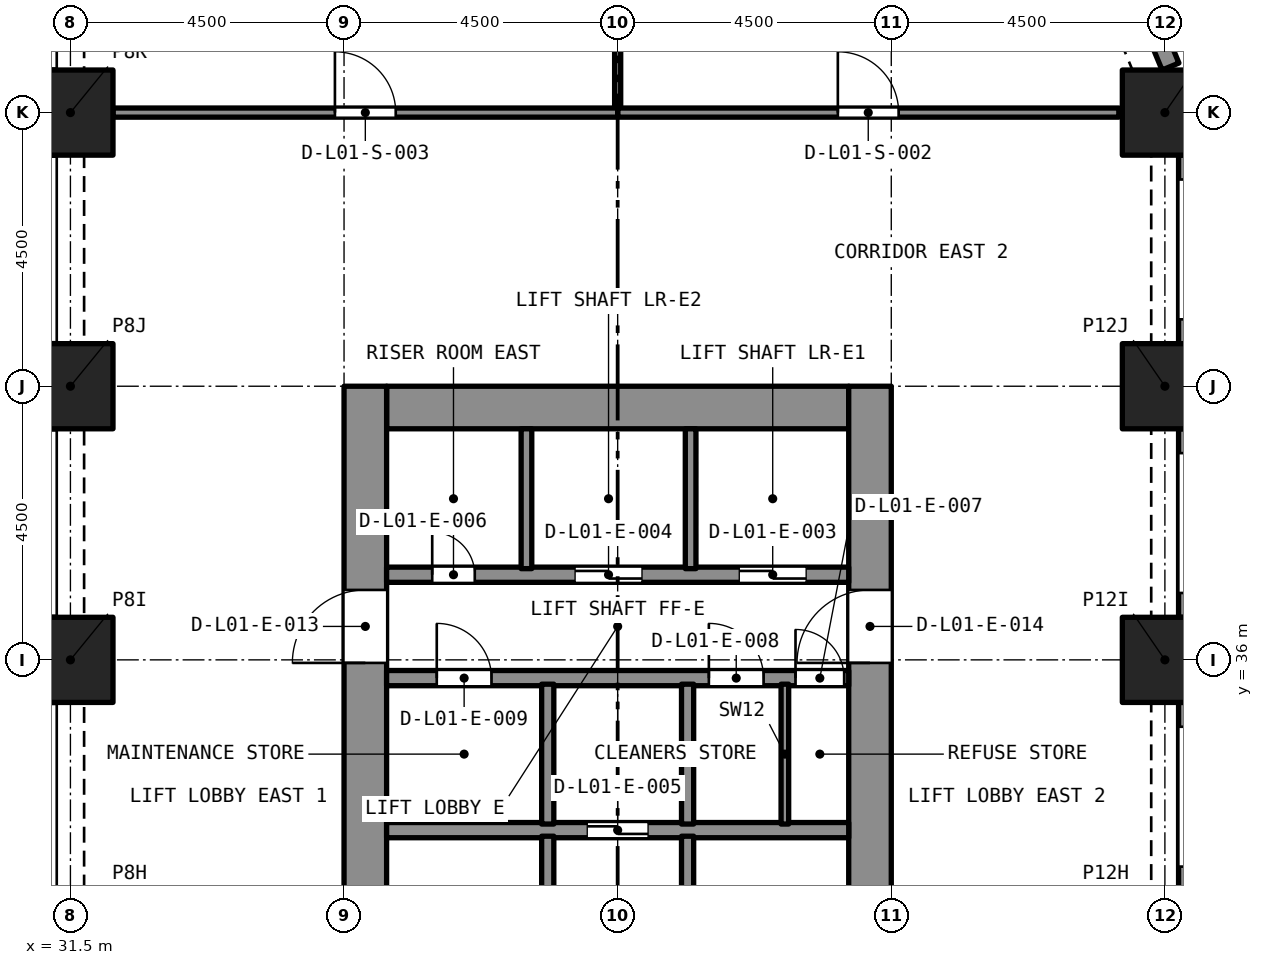
"""IFC4 building model, lengths in metres.
Left out: names, types, materials, properties, quantities, classifications, styles, units other than length and angle.
Written with IfcOpenShell. Run it as: python <this file> out.ifc"""

import sys

from ifc_helpers import new_model, si_unit, direction, frame, frame_2d, origin, origin_2d, place, context, subcontext, project, spatial, rectangle, extrude, element, fill, save


model = new_model("IFC4")
c1 = context("Model", 3, precision=1e-05, world=origin(), true_north=direction((0.0, 1.0)))
c2 = subcontext(c1, "Body", "Model", "MODEL_VIEW")
j1 = project(units=[si_unit("LENGTHUNIT", "METRE"), si_unit("PLANEANGLEUNIT", "RADIAN")], contexts=[c1])
p1 = place(None, origin())
s1 = spatial("IfcSite", under=j1, at=p1, CompositionType="ELEMENT")
p2 = place(p1, origin())
s2 = spatial("IfcBuilding", under=s1, at=p2, CompositionType="ELEMENT")
p3 = place(p2, frame((0.0, 0.0, 6.0)))
s3 = spatial("IfcBuildingStorey", under=s2, at=p3, CompositionType="ELEMENT", Elevation=6.0)
for number, where, z_axis, x_axis in (
    (1, (31.5, 36.0, 0.0), (0.0, 0.0, 1.0), (1.0, 0.0, 0.0)),
    (2, (49.5, 36.0, 0.0), (0.0, 0.0, 1.0), (1.0, 0.0, 0.0)),
    (3, (31.5, 40.5, 0.0), (0.0, 0.0, 1.0), (1.0, 0.0, 0.0)),
    (4, (49.5, 40.5, 0.0), (0.0, 0.0, 1.0), (1.0, 0.0, 0.0)),
    (5, (31.5, 45.0, 0.0), (0.0, 0.0, 1.0), (1.0, 0.0, 0.0)),
    (6, (49.5, 45.0, 0.0), (0.0, 0.0, 1.0), (1.0, 0.0, 0.0)),
):
    element("IfcColumn", number, at=place(p3, frame(where, z_axis=z_axis, x_axis=x_axis)), inside=s3, PredefinedType="COLUMN", context=c2, shape_type="SweptSolid", body=[
        extrude(rectangle(XDim=1.4, YDim=1.4, at=origin_2d()), origin(), (0.0, 0.0, 1.0), 5.0),
    ])
p4 = place(p3, frame((36.7, 40.15, 0.0), z_axis=(0.0, 0.0, 1.0), x_axis=(1.0, 0.0, 0.0)))
e7 = element("IfcWall", 7, at=p4, inside=s3, PredefinedType="SOLIDWALL", context=c2, shape_type="SweptSolid", body=[
    extrude(rectangle(XDim=7.6, YDim=0.7, at=frame_2d((3.8, 0.0))), origin(), (0.0, 0.0, 1.0), 5.0),
])
p5 = place(p3, frame((36.35, 27.0, 0.0), z_axis=(0.0, 0.0, 1.0), x_axis=(0.0, 1.0, 0.0)))
e8 = element("IfcWall", 8, at=p5, inside=s3, PredefinedType="SOLIDWALL", context=c2, shape_type="SweptSolid", body=[
    extrude(rectangle(XDim=13.5, YDim=0.7, at=frame_2d((6.75, 0.0))), origin(), (0.0, 0.0, 1.0), 5.0),
])
p6 = place(p5, frame((8.95, 0.0, 0.0)))
e9 = element("IfcOpeningElement", 9, at=p6, cuts=e8, PredefinedType="OPENING", context=c2, shape_type="SweptSolid", body=[
    extrude(rectangle(XDim=1.2, YDim=2.1, at=frame_2d((0.6, 1.05))), frame((0.0, 0.36, 0.0), z_axis=(0.0, -1.0, 0.0), x_axis=(1.0, 0.0, 0.0)), (0.0, 0.0, 1.0), 0.72),
])
p7 = place(p3, frame((44.65, 27.0, 0.0), z_axis=(0.0, 0.0, 1.0), x_axis=(0.0, 1.0, 0.0)))
e10 = element("IfcWall", 10, at=p7, inside=s3, PredefinedType="SOLIDWALL", context=c2, shape_type="SweptSolid", body=[
    extrude(rectangle(XDim=13.5, YDim=0.7, at=frame_2d((6.75, 0.0))), origin(), (0.0, 0.0, 1.0), 5.0),
])
p8 = place(p7, frame((8.95, 0.0, 0.0)))
e11 = element("IfcOpeningElement", 11, at=p8, cuts=e10, PredefinedType="OPENING", context=c2, shape_type="SweptSolid", body=[
    extrude(rectangle(XDim=1.2, YDim=2.1, at=frame_2d((0.6, 1.05))), frame((0.0, 0.36, 0.0), z_axis=(0.0, -1.0, 0.0), x_axis=(1.0, 0.0, 0.0)), (0.0, 0.0, 1.0), 0.72),
])
p9 = place(p3, frame((49.875, 35.3, 0.0), z_axis=(0.0, 0.0, 1.0), x_axis=(0.0, -1.0, 0.0)))
e12 = element("IfcWall", 12, at=p9, inside=s3, PredefinedType="SOLIDWALL", context=c2, shape_type="SweptSolid", body=[
    extrude(rectangle(XDim=3.1, YDim=0.3, at=frame_2d((1.55, 0.0))), origin(), (0.0, 0.0, 1.0), 5.0),
])
p10 = place(p9, frame((0.4, 0.0, 0.45)))
e13 = element("IfcOpeningElement", 13, at=p10, cuts=e12, PredefinedType="OPENING", context=c2, shape_type="SweptSolid", body=[
    extrude(rectangle(XDim=2.3, YDim=3.3, at=frame_2d((1.15, 1.65))), frame((0.0, 0.16, 0.0), z_axis=(0.0, -1.0, 0.0), x_axis=(1.0, 0.0, 0.0)), (0.0, 0.0, 1.0), 0.32),
])
p11 = place(p3, frame((49.875, 39.8, 0.0), z_axis=(0.0, 0.0, 1.0), x_axis=(0.0, -1.0, 0.0)))
e14 = element("IfcWall", 14, at=p11, inside=s3, PredefinedType="SOLIDWALL", context=c2, shape_type="SweptSolid", body=[
    extrude(rectangle(XDim=3.1, YDim=0.3, at=frame_2d((1.55, 0.0))), origin(), (0.0, 0.0, 1.0), 5.0),
])
p12 = place(p11, frame((0.4, 0.0, 0.45)))
e15 = element("IfcOpeningElement", 15, at=p12, cuts=e14, PredefinedType="OPENING", context=c2, shape_type="SweptSolid", body=[
    extrude(rectangle(XDim=2.3, YDim=3.3, at=frame_2d((1.15, 1.65))), frame((0.0, 0.16, 0.0), z_axis=(0.0, -1.0, 0.0), x_axis=(1.0, 0.0, 0.0)), (0.0, 0.0, 1.0), 0.32),
])
p13 = place(p3, frame((49.875, 44.3, 0.0), z_axis=(0.0, 0.0, 1.0), x_axis=(0.0, -1.0, 0.0)))
e16 = element("IfcWall", 16, at=p13, inside=s3, PredefinedType="SOLIDWALL", context=c2, shape_type="SweptSolid", body=[
    extrude(rectangle(XDim=3.1, YDim=0.3, at=frame_2d((1.55, 0.0))), origin(), (0.0, 0.0, 1.0), 5.0),
])
p14 = place(p13, frame((0.4, 0.0, 0.45)))
e17 = element("IfcOpeningElement", 17, at=p14, cuts=e16, PredefinedType="OPENING", context=c2, shape_type="SweptSolid", body=[
    extrude(rectangle(XDim=2.3, YDim=3.3, at=frame_2d((1.15, 1.65))), frame((0.0, 0.16, 0.0), z_axis=(0.0, -1.0, 0.0), x_axis=(1.0, 0.0, 0.0)), (0.0, 0.0, 1.0), 0.32),
])
p15 = place(p3, frame((48.878, 47.48, 0.0), z_axis=(0.0, 0.0, 1.0), x_axis=(0.38262540684, -0.923903565336, 0.0)))
e18 = element("IfcWall", 18, at=p15, inside=s3, PredefinedType="SOLIDWALL", context=c2, shape_type="SweptSolid", body=[
    extrude(rectangle(XDim=1.865, YDim=0.3, at=frame_2d((0.933, 0.0))), origin(), (0.0, 0.0, 1.0), 5.0),
])
p16 = place(p15, frame((0.258, 0.0, 0.45)))
e19 = element("IfcOpeningElement", 19, at=p16, cuts=e18, PredefinedType="OPENING", context=c2, shape_type="SweptSolid", body=[
    extrude(rectangle(XDim=1.1, YDim=3.3, at=frame_2d((0.55, 1.65))), frame((0.0, 0.16, 0.0), z_axis=(0.0, -1.0, 0.0), x_axis=(1.0, 0.0, 0.0)), (0.0, 0.0, 1.0), 0.32),
])
p17 = place(p3, frame((36.7, 33.2, 0.0), z_axis=(0.0, 0.0, 1.0), x_axis=(1.0, 0.0, 0.0)))
e20 = element("IfcWall", 20, at=p17, inside=s3, PredefinedType="SOLIDWALL", context=c2, shape_type="SweptSolid", body=[
    extrude(rectangle(XDim=7.6, YDim=0.25, at=frame_2d((3.8, 0.0))), origin(), (0.0, 0.0, 1.0), 4.65),
])
p18 = place(p17, frame((3.3, 0.0, 0.0)))
e21 = element("IfcOpeningElement", 21, at=p18, cuts=e20, PredefinedType="OPENING", context=c2, shape_type="SweptSolid", body=[
    extrude(rectangle(XDim=1.0, YDim=2.1, at=frame_2d((0.5, 1.05))), frame((0.0, 0.135, 0.0), z_axis=(0.0, -1.0, 0.0), x_axis=(1.0, 0.0, 0.0)), (0.0, 0.0, 1.0), 0.27),
])
p19 = place(p3, frame((36.7, 35.7, 0.0), z_axis=(0.0, 0.0, 1.0), x_axis=(1.0, 0.0, 0.0)))
e22 = element("IfcWall", 22, at=p19, inside=s3, PredefinedType="SOLIDWALL", context=c2, shape_type="SweptSolid", body=[
    extrude(rectangle(XDim=7.6, YDim=0.25, at=frame_2d((3.8, 0.0))), origin(), (0.0, 0.0, 1.0), 4.65),
])
p20 = place(p19, frame((6.725, 0.0, 0.0)))
e23 = element("IfcOpeningElement", 23, at=p20, cuts=e22, PredefinedType="OPENING", context=c2, shape_type="SweptSolid", body=[
    extrude(rectangle(XDim=0.8, YDim=2.1, at=frame_2d((0.4, 1.05))), frame((0.0, 0.135, 0.0), z_axis=(0.0, -1.0, 0.0), x_axis=(1.0, 0.0, 0.0)), (0.0, 0.0, 1.0), 0.27),
])
p21 = place(p19, frame((5.3, 0.0, 0.0)))
e24 = element("IfcOpeningElement", 24, at=p21, cuts=e22, PredefinedType="OPENING", context=c2, shape_type="SweptSolid", body=[
    extrude(rectangle(XDim=0.9, YDim=2.1, at=frame_2d((0.45, 1.05))), frame((0.0, 0.135, 0.0), z_axis=(0.0, -1.0, 0.0), x_axis=(1.0, 0.0, 0.0)), (0.0, 0.0, 1.0), 0.27),
])
p22 = place(p19, frame((0.825, 0.0, 0.0)))
e25 = element("IfcOpeningElement", 25, at=p22, cuts=e22, PredefinedType="OPENING", context=c2, shape_type="SweptSolid", body=[
    extrude(rectangle(XDim=0.9, YDim=2.1, at=frame_2d((0.45, 1.05))), frame((0.0, 0.135, 0.0), z_axis=(0.0, -1.0, 0.0), x_axis=(1.0, 0.0, 0.0)), (0.0, 0.0, 1.0), 0.27),
])
p23 = place(p3, frame((36.7, 37.4, 0.0), z_axis=(0.0, 0.0, 1.0), x_axis=(1.0, 0.0, 0.0)))
e26 = element("IfcWall", 26, at=p23, inside=s3, PredefinedType="SOLIDWALL", context=c2, shape_type="SweptSolid", body=[
    extrude(rectangle(XDim=7.6, YDim=0.25, at=frame_2d((3.8, 0.0))), origin(), (0.0, 0.0, 1.0), 4.65),
])
p24 = place(p23, frame((5.8, 0.0, 0.0)))
e27 = element("IfcOpeningElement", 27, at=p24, cuts=e26, PredefinedType="OPENING", context=c2, shape_type="SweptSolid", body=[
    extrude(rectangle(XDim=1.1, YDim=2.4, at=frame_2d((0.55, 1.2))), frame((0.0, 0.135, 0.0), z_axis=(0.0, -1.0, 0.0), x_axis=(1.0, 0.0, 0.0)), (0.0, 0.0, 1.0), 0.27),
])
p25 = place(p23, frame((3.1, 0.0, 0.0)))
e28 = element("IfcOpeningElement", 28, at=p25, cuts=e26, PredefinedType="OPENING", context=c2, shape_type="SweptSolid", body=[
    extrude(rectangle(XDim=1.1, YDim=2.4, at=frame_2d((0.55, 1.2))), frame((0.0, 0.135, 0.0), z_axis=(0.0, -1.0, 0.0), x_axis=(1.0, 0.0, 0.0)), (0.0, 0.0, 1.0), 0.27),
])
p26 = place(p23, frame((0.75, 0.0, 0.0)))
e29 = element("IfcOpeningElement", 29, at=p26, cuts=e26, PredefinedType="OPENING", context=c2, shape_type="SweptSolid", body=[
    extrude(rectangle(XDim=0.7, YDim=2.1, at=frame_2d((0.35, 1.05))), frame((0.0, 0.135, 0.0), z_axis=(0.0, -1.0, 0.0), x_axis=(1.0, 0.0, 0.0)), (0.0, 0.0, 1.0), 0.27),
])
p27 = place(p3, frame((41.65, 27.7, 0.0), z_axis=(0.0, 0.0, 1.0), x_axis=(0.0, 1.0, 0.0)))
e30 = element("IfcWall", 30, at=p27, inside=s3, PredefinedType="SOLIDWALL", context=c2, shape_type="SweptSolid", body=[
    extrude(rectangle(XDim=5.4, YDim=0.2, at=frame_2d((2.7, 0.0))), origin(), (0.0, 0.0, 1.0), 4.65),
])
p28 = place(p27, frame((0.2, 0.0, 0.0)))
e31 = element("IfcOpeningElement", 31, at=p28, cuts=e30, PredefinedType="OPENING", context=c2, shape_type="SweptSolid", body=[
    extrude(rectangle(XDim=0.9, YDim=2.1, at=frame_2d((0.45, 1.05))), frame((0.0, 0.11, 0.0), z_axis=(0.0, -1.0, 0.0), x_axis=(1.0, 0.0, 0.0)), (0.0, 0.0, 1.0), 0.22),
])
p29 = place(p3, frame((39.35, 27.7, 0.0), z_axis=(0.0, 0.0, 1.0), x_axis=(0.0, 1.0, 0.0)))
e32 = element("IfcWall", 32, at=p29, inside=s3, PredefinedType="SOLIDWALL", context=c2, shape_type="SweptSolid", body=[
    extrude(rectangle(XDim=5.4, YDim=0.2, at=frame_2d((2.7, 0.0))), origin(), (0.0, 0.0, 1.0), 4.65),
])
p30 = place(p29, frame((0.2, 0.0, 0.0)))
e33 = element("IfcOpeningElement", 33, at=p30, cuts=e32, PredefinedType="OPENING", context=c2, shape_type="SweptSolid", body=[
    extrude(rectangle(XDim=0.9, YDim=2.1, at=frame_2d((0.45, 1.05))), frame((0.0, 0.11, 0.0), z_axis=(0.0, -1.0, 0.0), x_axis=(1.0, 0.0, 0.0)), (0.0, 0.0, 1.0), 0.22),
])
for number, where, z_axis, x_axis in (
    (34, (41.65, 33.3, 0.0), (0.0, 0.0, 1.0), (0.0, 1.0, 0.0)),
    (35, (39.35, 33.3, 0.0), (0.0, 0.0, 1.0), (0.0, 1.0, 0.0)),
):
    element("IfcWall", number, at=place(p3, frame(where, z_axis=z_axis, x_axis=x_axis)), inside=s3, PredefinedType="SOLIDWALL", context=c2, shape_type="SweptSolid", body=[
        extrude(rectangle(XDim=2.3, YDim=0.2, at=frame_2d((1.15, 0.0))), origin(), (0.0, 0.0, 1.0), 4.65),
    ])
for number, where, z_axis, x_axis in (
    (36, (41.7, 37.5, 0.0), (0.0, 0.0, 1.0), (0.0, 1.0, 0.0)),
    (37, (39.0, 37.5, 0.0), (0.0, 0.0, 1.0), (0.0, 1.0, 0.0)),
):
    element("IfcWall", number, at=place(p3, frame(where, z_axis=z_axis, x_axis=x_axis)), inside=s3, PredefinedType="SOLIDWALL", context=c2, shape_type="SweptSolid", body=[
        extrude(rectangle(XDim=2.3, YDim=0.175, at=frame_2d((1.15, 0.0))), origin(), (0.0, 0.0, 1.0), 4.65),
    ])
p31 = place(p3, frame((43.25, 33.3, 0.0), z_axis=(0.0, 0.0, 1.0), x_axis=(0.0, 1.0, 0.0)))
e38 = element("IfcWall", 38, at=p31, inside=s3, PredefinedType="PARTITIONING", context=c2, shape_type="SweptSolid", body=[
    extrude(rectangle(XDim=2.3, YDim=0.125, at=frame_2d((1.15, 0.0))), origin(), (0.0, 0.0, 1.0), 4.65),
])
p32 = place(p3, frame((40.5, 45.075, 0.0), z_axis=(0.0, 0.0, 1.0), x_axis=(0.0, 1.0, 0.0)))
e39 = element("IfcWall", 39, at=p32, inside=s3, PredefinedType="PARTITIONING", context=c2, shape_type="SweptSolid", body=[
    extrude(rectangle(XDim=3.725, YDim=0.1, at=frame_2d((1.863, 0.0))), origin(), (0.0, 0.0, 1.0), 4.65),
])
p33 = place(p3, frame((40.5, 45.0, 0.0), z_axis=(0.0, 0.0, 1.0), x_axis=(1.0, 0.0, 0.0)))
e40 = element("IfcWall", 40, at=p33, inside=s3, PredefinedType="PARTITIONING", context=c2, shape_type="SweptSolid", body=[
    extrude(rectangle(XDim=8.242, YDim=0.15, at=frame_2d((4.121, 0.0))), origin(), (0.0, 0.0, 1.0), 4.65),
])
p34 = place(p33, frame((3.621, 0.0, 0.0)))
e41 = element("IfcOpeningElement", 41, at=p34, cuts=e40, PredefinedType="OPENING", context=c2, shape_type="SweptSolid", body=[
    extrude(rectangle(XDim=1.0, YDim=2.1, at=frame_2d((0.5, 1.05))), frame((0.0, 0.085, 0.0), z_axis=(0.0, -1.0, 0.0), x_axis=(1.0, 0.0, 0.0)), (0.0, 0.0, 1.0), 0.17),
])
p35 = place(p3, frame((32.2, 45.0, 0.0), z_axis=(0.0, 0.0, 1.0), x_axis=(1.0, 0.0, 0.0)))
e42 = element("IfcWall", 42, at=p35, inside=s3, PredefinedType="PARTITIONING", context=c2, shape_type="SweptSolid", body=[
    extrude(rectangle(XDim=8.3, YDim=0.15, at=frame_2d((4.15, 0.0))), origin(), (0.0, 0.0, 1.0), 4.65),
])
p36 = place(p35, frame((3.65, 0.0, 0.0)))
e43 = element("IfcOpeningElement", 43, at=p36, cuts=e42, PredefinedType="OPENING", context=c2, shape_type="SweptSolid", body=[
    extrude(rectangle(XDim=1.0, YDim=2.1, at=frame_2d((0.5, 1.05))), frame((0.0, 0.085, 0.0), z_axis=(0.0, -1.0, 0.0), x_axis=(1.0, 0.0, 0.0)), (0.0, 0.0, 1.0), 0.17),
])
p37 = place(p24, origin())
e44 = element("IfcDoor", 44, at=p37, inside=s3, OperationType="SLIDING_TO_LEFT", PredefinedType="DOOR", context=c2, shape_type="SweptSolid", body=[
    extrude(rectangle(XDim=1.1, YDim=2.4, at=frame_2d((0.55, 1.2))), frame((0.0, 0.025, 0.0), z_axis=(0.0, -1.0, 0.0), x_axis=(1.0, 0.0, 0.0)), (0.0, 0.0, 1.0), 0.05),
])
fill(e27, e44)
p38 = place(p25, origin())
e45 = element("IfcDoor", 45, at=p38, inside=s3, OperationType="SLIDING_TO_LEFT", PredefinedType="DOOR", context=c2, shape_type="SweptSolid", body=[
    extrude(rectangle(XDim=1.1, YDim=2.4, at=frame_2d((0.55, 1.2))), frame((0.0, 0.025, 0.0), z_axis=(0.0, -1.0, 0.0), x_axis=(1.0, 0.0, 0.0)), (0.0, 0.0, 1.0), 0.05),
])
fill(e28, e45)
p39 = place(p18, origin())
e46 = element("IfcDoor", 46, at=p39, inside=s3, OperationType="SLIDING_TO_LEFT", PredefinedType="DOOR", context=c2, shape_type="SweptSolid", body=[
    extrude(rectangle(XDim=1.0, YDim=2.1, at=frame_2d((0.5, 1.05))), frame((0.0, 0.025, 0.0), z_axis=(0.0, -1.0, 0.0), x_axis=(1.0, 0.0, 0.0)), (0.0, 0.0, 1.0), 0.05),
])
fill(e21, e46)
p40 = place(p26, origin())
e47 = element("IfcDoor", 47, at=p40, inside=s3, OperationType="SINGLE_SWING_LEFT", PredefinedType="DOOR", context=c2, shape_type="SweptSolid", body=[
    extrude(rectangle(XDim=0.7, YDim=2.1, at=frame_2d((0.35, 1.05))), frame((0.0, 0.025, 0.0), z_axis=(0.0, -1.0, 0.0), x_axis=(1.0, 0.0, 0.0)), (0.0, 0.0, 1.0), 0.05),
])
fill(e29, e47)
p41 = place(p20, origin())
e48 = element("IfcDoor", 48, at=p41, inside=s3, OperationType="SINGLE_SWING_LEFT", PredefinedType="DOOR", context=c2, shape_type="SweptSolid", body=[
    extrude(rectangle(XDim=0.8, YDim=2.1, at=frame_2d((0.4, 1.05))), frame((0.0, 0.025, 0.0), z_axis=(0.0, -1.0, 0.0), x_axis=(1.0, 0.0, 0.0)), (0.0, 0.0, 1.0), 0.05),
])
fill(e23, e48)
p42 = place(p21, origin())
e49 = element("IfcDoor", 49, at=p42, inside=s3, OperationType="SINGLE_SWING_LEFT", PredefinedType="DOOR", context=c2, shape_type="SweptSolid", body=[
    extrude(rectangle(XDim=0.9, YDim=2.1, at=frame_2d((0.45, 1.05))), frame((0.0, 0.025, 0.0), z_axis=(0.0, -1.0, 0.0), x_axis=(1.0, 0.0, 0.0)), (0.0, 0.0, 1.0), 0.05),
])
fill(e24, e49)
p43 = place(p22, origin())
e50 = element("IfcDoor", 50, at=p43, inside=s3, OperationType="SINGLE_SWING_LEFT", PredefinedType="DOOR", context=c2, shape_type="SweptSolid", body=[
    extrude(rectangle(XDim=0.9, YDim=2.1, at=frame_2d((0.45, 1.05))), frame((0.0, 0.025, 0.0), z_axis=(0.0, -1.0, 0.0), x_axis=(1.0, 0.0, 0.0)), (0.0, 0.0, 1.0), 0.05),
])
fill(e25, e50)
p44 = place(p6, origin())
e51 = element("IfcDoor", 51, at=p44, inside=s3, OperationType="SINGLE_SWING_LEFT", PredefinedType="DOOR", context=c2, shape_type="SweptSolid", body=[
    extrude(rectangle(XDim=1.2, YDim=2.1, at=frame_2d((0.6, 1.05))), frame((0.0, 0.025, 0.0), z_axis=(0.0, -1.0, 0.0), x_axis=(1.0, 0.0, 0.0)), (0.0, 0.0, 1.0), 0.05),
])
fill(e9, e51)
p45 = place(p8, origin())
e52 = element("IfcDoor", 52, at=p45, inside=s3, OperationType="SINGLE_SWING_LEFT", PredefinedType="DOOR", context=c2, shape_type="SweptSolid", body=[
    extrude(rectangle(XDim=1.2, YDim=2.1, at=frame_2d((0.6, 1.05))), frame((0.0, 0.025, 0.0), z_axis=(0.0, -1.0, 0.0), x_axis=(1.0, 0.0, 0.0)), (0.0, 0.0, 1.0), 0.05),
])
fill(e11, e52)
p46 = place(p34, origin())
e53 = element("IfcDoor", 53, at=p46, inside=s3, OperationType="SINGLE_SWING_RIGHT", PredefinedType="DOOR", context=c2, shape_type="SweptSolid", body=[
    extrude(rectangle(XDim=1.0, YDim=2.1, at=frame_2d((0.5, 1.05))), frame((0.0, 0.025, 0.0), z_axis=(0.0, -1.0, 0.0), x_axis=(1.0, 0.0, 0.0)), (0.0, 0.0, 1.0), 0.05),
])
fill(e41, e53)
p47 = place(p36, origin())
e54 = element("IfcDoor", 54, at=p47, inside=s3, OperationType="SINGLE_SWING_RIGHT", PredefinedType="DOOR", context=c2, shape_type="SweptSolid", body=[
    extrude(rectangle(XDim=1.0, YDim=2.1, at=frame_2d((0.5, 1.05))), frame((0.0, 0.025, 0.0), z_axis=(0.0, -1.0, 0.0), x_axis=(1.0, 0.0, 0.0)), (0.0, 0.0, 1.0), 0.05),
])
fill(e43, e54)
save(model, sys.argv[1])
